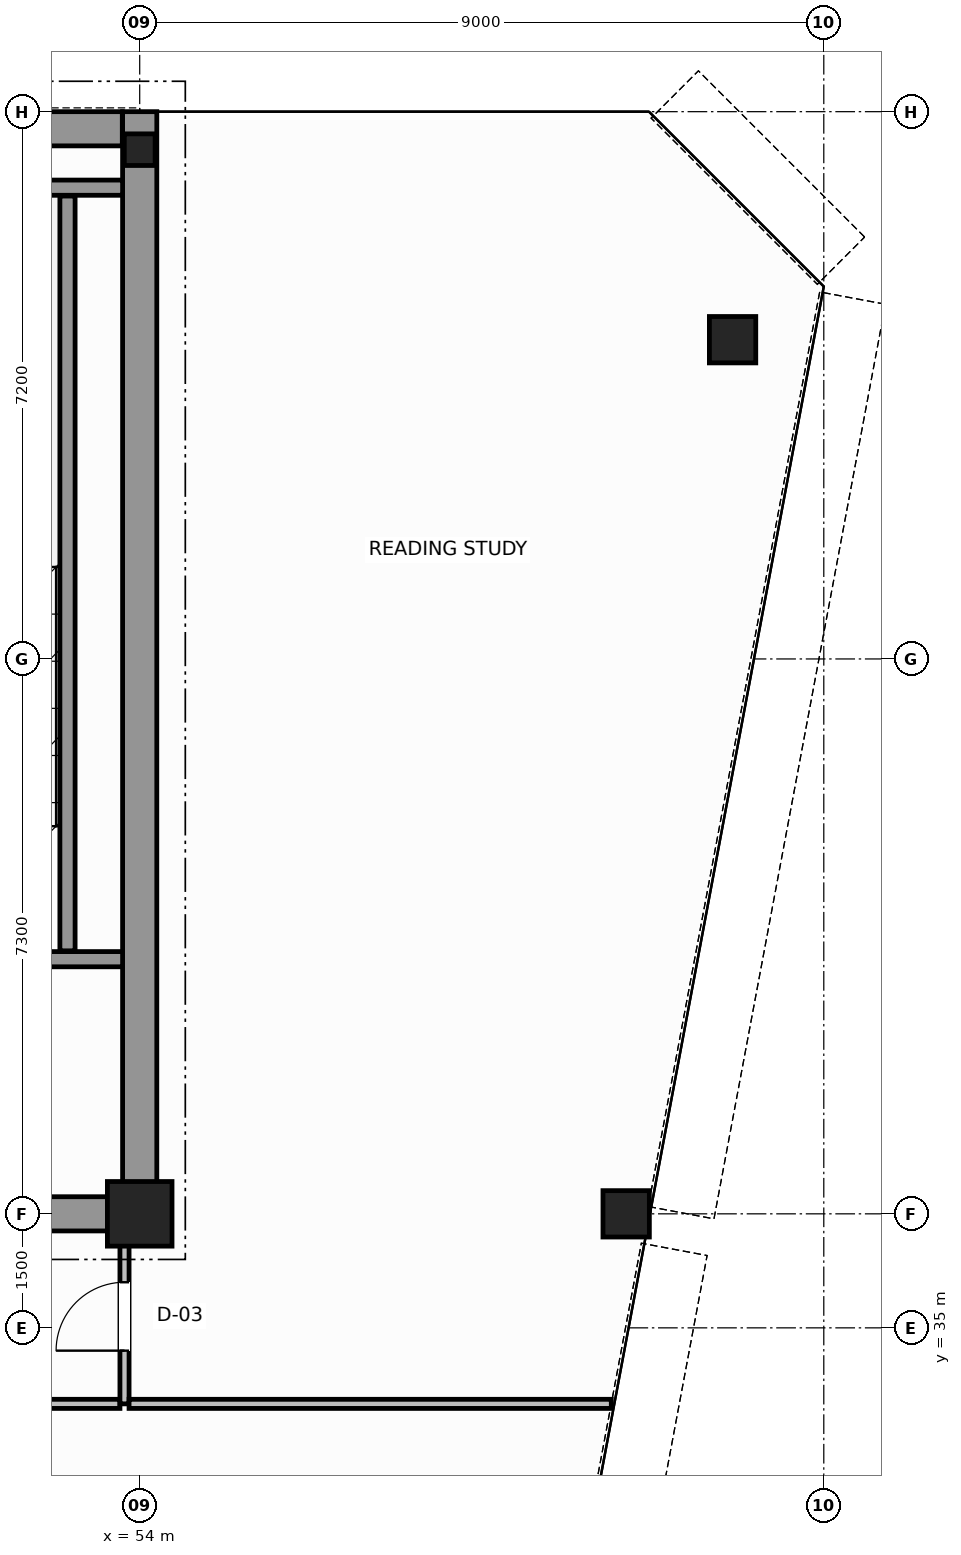
"""IFC4 building model, lengths in metres.
Left out: names, types, materials, properties, quantities, classifications, styles, units other than length and angle.
Written with IfcOpenShell. Run it as: python <this file> out.ifc"""

import sys

from ifc_helpers import new_model, si_unit, direction, frame, frame_2d, origin, origin_2d, place, context, subcontext, project, spatial, rectangle, hollow_circle, i_section, extrude, source, transform, mapped, element, fill, save


model = new_model("IFC4")
c1 = context("Model", 3, precision=1e-05, world=origin(), true_north=direction((0.0, 1.0)))
c2 = subcontext(c1, "Body", "Model", "MODEL_VIEW")
j1 = project(units=[si_unit("LENGTHUNIT", "METRE"), si_unit("PLANEANGLEUNIT", "RADIAN")], contexts=[c1])
p1 = place(None, origin())
s1 = spatial("IfcSite", under=j1, at=p1, CompositionType="ELEMENT")
p2 = place(p1, origin())
s2 = spatial("IfcBuilding", under=s1, at=p2, CompositionType="ELEMENT")
p3 = place(p2, frame((0.0, 0.0, 295.4)))
s3 = spatial("IfcBuildingStorey", under=s2, at=p3, CompositionType="ELEMENT", Elevation=295.4)
m1 = source(origin(), c2, "Body", "SweptSolid", [
    extrude(rectangle(XDim=0.85, YDim=0.85, at=origin_2d()), origin(), (0.0, 0.0, 1.0), 3.8),
])
p4 = place(p3, frame((54.0, 36.5, 0.0), z_axis=(0.0, 0.0, 1.0), x_axis=(1.0, 0.0, 0.0)))
e1 = element("IfcColumn", 1, at=p4, inside=s3, PredefinedType="COLUMN", context=c2, shape_type="MappedRepresentation", body=[
    mapped(m1, transform((0.0, 0.0, 0.0), scale=1.0)),
])
m2 = source(origin(), c2, "Body", "SweptSolid", [
    extrude(i_section(OverallWidth=0.406, OverallDepth=0.416, WebThickness=0.03, FlangeThickness=0.042, FilletRadius=0.015, at=origin_2d()), origin(), (0.0, 0.0, 1.0), 3.8),
])
p5 = place(p3, frame((54.0, 50.5, 0.0), z_axis=(0.0, 0.0, 1.0), x_axis=(1.0, 0.0, 0.0)))
e2 = element("IfcColumn", 2, at=p5, inside=s3, PredefinedType="COLUMN", context=c2, shape_type="MappedRepresentation", body=[
    mapped(m2, transform((0.0, 0.0, 0.0), scale=1.0)),
])
m3 = source(origin(), c2, "Body", "SweptSolid", [
    extrude(hollow_circle(Radius=0.305, WallThickness=0.03, at=origin_2d()), origin(), (0.0, 0.0, 1.0), 3.8),
])
for number, where, z_axis, x_axis in (
    (3, (61.8, 48.0, 0.0), (0.0, 0.0, 1.0), (1.0, 0.0, 0.0)),
    (4, (60.4, 36.5, 0.0), (0.0, 0.0, 1.0), (1.0, 0.0, 0.0)),
):
    element("IfcColumn", number, at=place(p3, frame(where, z_axis=z_axis, x_axis=x_axis)), inside=s3, PredefinedType="COLUMN", context=c2, shape_type="MappedRepresentation", body=[
        mapped(m3, transform((0.0, 0.0, 0.0), scale=1.0)),
    ])
p6 = place(p3, frame((34.002, 50.775, 0.0), z_axis=(0.0, 0.0, 1.0), x_axis=(1.0, 0.0, 0.0)))
e5 = element("IfcWall", 5, at=p6, inside=s3, PredefinedType="SHEAR", context=c2, shape_type="SweptSolid", body=[
    extrude(rectangle(XDim=19.769, YDim=0.45, at=frame_2d((9.885, 0.0))), origin(), (0.0, 0.0, 1.0), 3.8),
])
p7 = place(p3, frame((54.0, 36.5, 0.0), z_axis=(0.0, 0.0, 1.0), x_axis=(0.0, 1.0, 0.0)))
e6 = element("IfcWall", 6, at=p7, inside=s3, PredefinedType="SHEAR", context=c2, shape_type="SweptSolid", body=[
    extrude(rectangle(XDim=14.5, YDim=0.45, at=frame_2d((7.25, 0.0))), origin(), (0.0, 0.0, 1.0), 3.8),
])
p8 = place(p3, frame((49.8, 36.5, 0.0), z_axis=(0.0, 0.0, 1.0), x_axis=(1.0, 0.0, 0.0)))
e7 = element("IfcWall", 7, at=p8, inside=s3, PredefinedType="SHEAR", context=c2, shape_type="SweptSolid", body=[
    extrude(rectangle(XDim=3.955, YDim=0.45, at=frame_2d((1.978, 0.0))), origin(), (0.0, 0.0, 1.0), 2.58),
])
p9 = place(p3, frame((49.4, 39.85, 0.0), z_axis=(0.0, 0.0, 1.0), x_axis=(1.0, 0.0, 0.0)))
e8 = element("IfcWall", 8, at=p9, inside=s3, PredefinedType="SOLIDWALL", context=c2, shape_type="SweptSolid", body=[
    extrude(rectangle(XDim=4.375, YDim=0.2, at=frame_2d((2.188, 0.0))), origin(), (0.0, 0.0, 1.0), 3.8),
])
p10 = place(p9, frame((1.325, 0.0, 0.0)))
e9 = element("IfcOpeningElement", 9, at=p10, cuts=e8, PredefinedType="OPENING", context=c2, shape_type="SweptSolid", body=[
    extrude(rectangle(XDim=1.1, YDim=2.15, at=frame_2d((0.55, 1.075))), frame((0.0, 0.11, 0.0), z_axis=(0.0, -1.0, 0.0), x_axis=(1.0, 0.0, 0.0)), (0.0, 0.0, 1.0), 0.22),
])
p11 = place(p3, frame((49.4, 50.0, 0.0), z_axis=(0.0, 0.0, 1.0), x_axis=(1.0, 0.0, 0.0)))
e10 = element("IfcWall", 10, at=p11, inside=s3, PredefinedType="SOLIDWALL", context=c2, shape_type="SweptSolid", body=[
    extrude(rectangle(XDim=4.375, YDim=0.2, at=frame_2d((2.188, 0.0))), origin(), (0.0, 0.0, 1.0), 3.8),
])
p12 = place(p3, frame((53.05, 39.96, 0.0), z_axis=(0.0, 0.0, 1.0), x_axis=(0.0, 1.0, 0.0)))
e11 = element("IfcWall", 11, at=p12, inside=s3, PredefinedType="SOLIDWALL", context=c2, shape_type="SweptSolid", body=[
    extrude(rectangle(XDim=9.93, YDim=0.2, at=frame_2d((4.965, 0.0))), origin(), (0.0, 0.0, 1.0), 3.8),
])
p13 = place(p3, frame((37.46, 34.0, 0.0), z_axis=(0.0, 0.0, 1.0), x_axis=(1.0, 0.0, 0.0)))
e12 = element("IfcWall", 12, at=p13, inside=s3, PredefinedType="PARTITIONING", context=c2, shape_type="SweptSolid", body=[
    extrude(rectangle(XDim=16.28, YDim=0.12, at=frame_2d((8.14, 0.0))), origin(), (0.0, 0.0, 1.0), 3.21),
])
p14 = place(p3, frame((53.8, 34.0, 0.0), z_axis=(0.0, 0.0, 1.0), x_axis=(0.0, 1.0, 0.0)))
e13 = element("IfcWall", 13, at=p14, inside=s3, PredefinedType="PARTITIONING", context=c2, shape_type="SweptSolid", body=[
    extrude(rectangle(XDim=2.44, YDim=0.12, at=frame_2d((1.22, 0.0))), origin(), (0.0, 0.0, 1.0), 3.58),
])
p15 = place(p14, frame((0.7, 0.0, 0.0)))
e14 = element("IfcOpeningElement", 14, at=p15, cuts=e13, PredefinedType="OPENING", context=c2, shape_type="SweptSolid", body=[
    extrude(rectangle(XDim=0.9, YDim=2.15, at=frame_2d((0.45, 1.075))), frame((0.0, 0.07, 0.0), z_axis=(0.0, -1.0, 0.0), x_axis=(1.0, 0.0, 0.0)), (0.0, 0.0, 1.0), 0.14),
])
p16 = place(p3, frame((53.86, 34.0, 0.0), z_axis=(0.0, 0.0, 1.0), x_axis=(1.0, 0.0, 0.0)))
e15 = element("IfcWall", 15, at=p16, inside=s3, PredefinedType="PARTITIONING", context=c2, shape_type="SweptSolid", body=[
    extrude(rectangle(XDim=6.344, YDim=0.12, at=frame_2d((3.172, 0.0))), origin(), (0.0, 0.0, 1.0), 3.21),
])
m4 = source(origin(), c2, "Body", "SweptSolid", [
    extrude(rectangle(XDim=0.9, YDim=2.15, at=frame_2d((0.45, 1.075))), frame((0.0, 0.025, 0.0), z_axis=(0.0, -1.0, 0.0), x_axis=(1.0, 0.0, 0.0)), (0.0, 0.0, 1.0), 0.05),
])
p17 = place(p15, origin())
e16 = element("IfcDoor", 16, at=p17, inside=s3, OperationType="SINGLE_SWING_RIGHT", PredefinedType="DOOR", context=c2, shape_type="MappedRepresentation", body=[
    mapped(m4, transform((0.0, 0.0, 0.0), scale=1.0)),
])
fill(e14, e16)
save(model, sys.argv[1])
